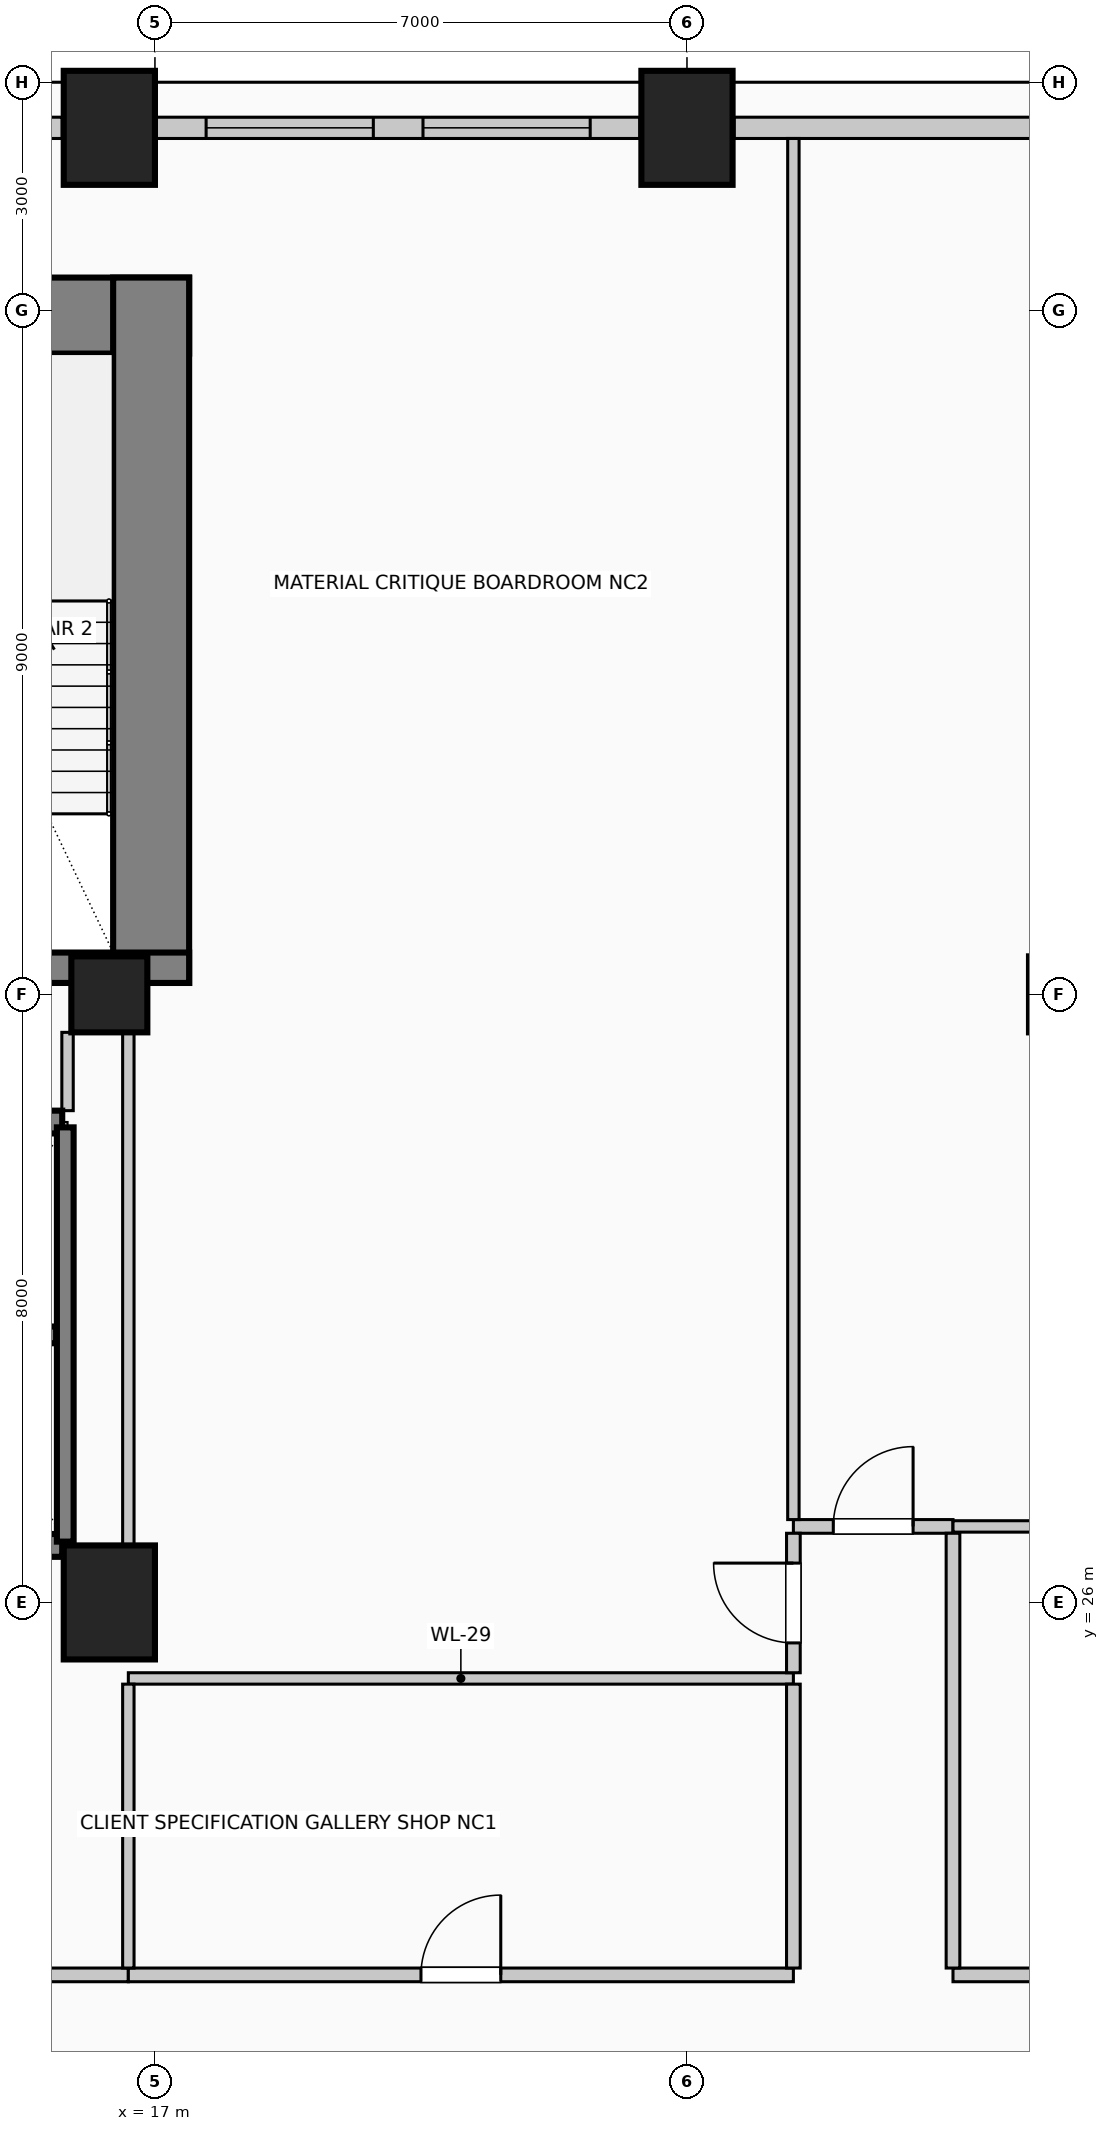
"""IFC4 building model, lengths in metres.
Left out: names, types, materials, properties, quantities, classifications, styles, units other than length and angle.
Written with IfcOpenShell. Run it as: python <this file> out.ifc"""

import sys

from ifc_helpers import new_model, si_unit, direction, frame, frame_2d, origin, origin_2d, place, context, subcontext, project, spatial, rectangle, circle, extrude, element, fill, save


model = new_model("IFC4")
c1 = context("Model", 3, precision=1e-05, world=origin(), true_north=direction((0.0, 1.0)))
c2 = subcontext(c1, "Body", "Model", "MODEL_VIEW")
j1 = project(units=[si_unit("LENGTHUNIT", "METRE"), si_unit("PLANEANGLEUNIT", "RADIAN")], contexts=[c1])
p1 = place(None, origin())
s1 = spatial("IfcSite", under=j1, at=p1, CompositionType="ELEMENT")
p2 = place(p1, origin())
s2 = spatial("IfcBuilding", under=s1, at=p2, CompositionType="ELEMENT")
p3 = place(p2, frame((0.0, 0.0, 58.6)))
s3 = spatial("IfcBuildingStorey", under=s2, at=p3, CompositionType="ELEMENT", Elevation=58.6)
p4 = place(p3, frame((2.55, 42.93, 0.0), z_axis=(0.0, 0.0, 1.0), x_axis=(1.0, 0.0, 0.0)))
e1 = element("IfcWall", 1, at=p4, inside=s3, PredefinedType="SHEAR", context=c2, shape_type="SweptSolid", body=[
    extrude(rectangle(XDim=14.9, YDim=1.0, at=frame_2d((7.45, 0.0))), origin(), (0.0, 0.0, 1.0), 4.0),
])
p5 = place(p3, frame((16.95, 34.15, 0.0), z_axis=(0.0, 0.0, 1.0), x_axis=(0.0, 1.0, 0.0)))
e2 = element("IfcWall", 2, at=p5, inside=s3, PredefinedType="SHEAR", context=c2, shape_type="SweptSolid", body=[
    extrude(rectangle(XDim=9.28, YDim=1.0, at=frame_2d((4.64, 0.0))), origin(), (0.0, 0.0, 1.0), 4.0),
])
p6 = place(p3, frame((12.29, 34.35, 0.0), z_axis=(0.0, 0.0, 1.0), x_axis=(1.0, 0.0, 0.0)))
e3 = element("IfcWall", 3, at=p6, inside=s3, PredefinedType="SHEAR", context=c2, shape_type="SweptSolid", body=[
    extrude(rectangle(XDim=5.16, YDim=0.4, at=frame_2d((2.58, 0.0))), origin(), (0.0, 0.0, 1.0), 4.0),
])
p7 = place(p6, frame((1.4, 0.0, 0.0)))
e4 = element("IfcOpeningElement", 4, at=p7, cuts=e3, PredefinedType="OPENING", context=c2, shape_type="SweptSolid", body=[
    extrude(rectangle(XDim=1.15, YDim=2.2, at=frame_2d((0.575, 1.1))), frame((0.0, 0.21, 0.0), z_axis=(0.0, -1.0, 0.0), x_axis=(1.0, 0.0, 0.0)), (0.0, 0.0, 1.0), 0.42),
])
for number, where, z_axis, x_axis in (
    (5, (16.4, 45.4, 0.0), (0.0, 0.0, 1.0), (1.0, 0.0, 0.0)),
    (6, (24.0, 45.4, 0.0), (0.0, 0.0, 1.0), (1.0, 0.0, 0.0)),
    (7, (16.4, 26.0, 0.0), (0.0, 0.0, 1.0), (1.0, 0.0, 0.0)),
):
    element("IfcColumn", number, at=place(p3, frame(where, z_axis=z_axis, x_axis=x_axis)), inside=s3, PredefinedType="COLUMN", context=c2, shape_type="SweptSolid", body=[
        extrude(rectangle(XDim=1.2, YDim=1.5, at=origin_2d()), origin(), (0.0, 0.0, 1.0), 4.0),
    ])
p8 = place(p3, frame((16.4, 34.0, 0.0), z_axis=(0.0, 0.0, 1.0), x_axis=(1.0, 0.0, 0.0)))
e8 = element("IfcColumn", 8, at=p8, inside=s3, PredefinedType="COLUMN", context=c2, shape_type="SweptSolid", body=[
    extrude(circle(Radius=0.5, at=origin_2d()), origin(), (0.0, 0.0, 1.0), 4.0),
])
p9 = place(p3, frame((14.47, 45.4, 0.0), z_axis=(0.0, 0.0, 1.0), x_axis=(1.0, 0.0, 0.0)))
e9 = element("IfcWall", 9, at=p9, inside=s3, PredefinedType="SOLIDWALL", context=c2, shape_type="SweptSolid", body=[
    extrude(rectangle(XDim=1.31, YDim=0.28, at=frame_2d((0.655, 0.0))), origin(), (0.0, 0.0, 1.0), 2.85),
])
p10 = place(p3, frame((17.02, 45.4, 0.0), z_axis=(0.0, 0.0, 1.0), x_axis=(1.0, 0.0, 0.0)))
e10 = element("IfcWall", 10, at=p10, inside=s3, PredefinedType="SOLIDWALL", context=c2, shape_type="SweptSolid", body=[
    extrude(rectangle(XDim=6.36, YDim=0.28, at=frame_2d((3.18, 0.0))), origin(), (0.0, 0.0, 1.0), 2.85),
])
p11 = place(p10, frame((0.653, 0.0, 0.5)))
e11 = element("IfcOpeningElement", 11, at=p11, cuts=e10, PredefinedType="OPENING", context=c2, shape_type="SweptSolid", body=[
    extrude(rectangle(XDim=2.2, YDim=1.95, at=frame_2d((1.1, 0.975))), frame((0.0, 0.15, 0.0), z_axis=(0.0, -1.0, 0.0), x_axis=(1.0, 0.0, 0.0)), (0.0, 0.0, 1.0), 0.3),
])
p12 = place(p10, frame((3.507, 0.0, 0.5)))
e12 = element("IfcOpeningElement", 12, at=p12, cuts=e10, PredefinedType="OPENING", context=c2, shape_type="SweptSolid", body=[
    extrude(rectangle(XDim=2.2, YDim=1.95, at=frame_2d((1.1, 0.975))), frame((0.0, 0.15, 0.0), z_axis=(0.0, -1.0, 0.0), x_axis=(1.0, 0.0, 0.0)), (0.0, 0.0, 1.0), 0.3),
])
p13 = place(p3, frame((24.62, 45.4, 0.0), z_axis=(0.0, 0.0, 1.0), x_axis=(1.0, 0.0, 0.0)))
e13 = element("IfcWall", 13, at=p13, inside=s3, PredefinedType="SOLIDWALL", context=c2, shape_type="SweptSolid", body=[
    extrude(rectangle(XDim=3.91, YDim=0.28, at=frame_2d((1.955, 0.0))), origin(), (0.0, 0.0, 1.0), 2.85),
])
for number, where, z_axis, x_axis in (
    (14, (15.78, 26.75, 0.0), (0.0, 0.0, 1.0), (-1.0, 0.0, 0.0)),
    (15, (14.0, 32.32, 0.0), (0.0, 0.0, 1.0), (1.0, 0.0, 0.0)),
):
    element("IfcWall", number, at=place(p3, frame(where, z_axis=z_axis, x_axis=x_axis)), inside=s3, PredefinedType="SOLIDWALL", context=c2, shape_type="SweptSolid", body=[
        extrude(rectangle(XDim=1.78, YDim=0.3, at=frame_2d((0.89, 0.0))), origin(), (0.0, 0.0, 1.0), 4.0),
    ])
p14 = place(p3, frame((15.82, 26.8, 0.0), z_axis=(0.0, 0.0, 1.0), x_axis=(0.0, 1.0, 0.0)))
e16 = element("IfcWall", 16, at=p14, inside=s3, PredefinedType="SOLIDWALL", context=c2, shape_type="SweptSolid", body=[
    extrude(rectangle(XDim=5.45, YDim=0.22, at=frame_2d((2.725, 0.0))), origin(), (0.0, 0.0, 1.0), 4.0),
])
p15 = place(p3, frame((12.3, 29.52, 0.0), z_axis=(0.0, 0.0, 1.0), x_axis=(1.0, 0.0, 0.0)))
e17 = element("IfcWall", 17, at=p15, inside=s3, PredefinedType="SOLIDWALL", context=c2, shape_type="SweptSolid", body=[
    extrude(rectangle(XDim=3.4, YDim=0.22, at=frame_2d((1.7, 0.0))), origin(), (0.0, 0.0, 1.0), 4.0),
])
p16 = place(p3, frame((12.2, 21.1, 0.0), z_axis=(0.0, 0.0, 1.0), x_axis=(1.0, 0.0, 0.0)))
e18 = element("IfcWall", 18, at=p16, inside=s3, PredefinedType="PARTITIONING", context=c2, shape_type="SweptSolid", body=[
    extrude(rectangle(XDim=4.45, YDim=0.18, at=frame_2d((2.225, 0.0))), origin(), (0.0, 0.0, 1.0), 3.7),
])
p17 = place(p3, frame((16.65, 21.1, 0.0), z_axis=(0.0, 0.0, 1.0), x_axis=(1.0, 0.0, 0.0)))
e19 = element("IfcWall", 19, at=p17, inside=s3, PredefinedType="PARTITIONING", context=c2, shape_type="SweptSolid", body=[
    extrude(rectangle(XDim=8.75, YDim=0.18, at=frame_2d((4.375, 0.0))), origin(), (0.0, 0.0, 1.0), 3.7),
])
p18 = place(p17, frame((3.85, 0.0, 0.0)))
e20 = element("IfcOpeningElement", 20, at=p18, cuts=e19, PredefinedType="OPENING", context=c2, shape_type="SweptSolid", body=[
    extrude(rectangle(XDim=1.05, YDim=2.15, at=frame_2d((0.525, 1.075))), frame((0.0, 0.1, 0.0), z_axis=(0.0, -1.0, 0.0), x_axis=(1.0, 0.0, 0.0)), (0.0, 0.0, 1.0), 0.2),
])
p19 = place(p3, frame((27.5, 21.1, 0.0), z_axis=(0.0, 0.0, 1.0), x_axis=(1.0, 0.0, 0.0)))
e21 = element("IfcWall", 21, at=p19, inside=s3, PredefinedType="PARTITIONING", context=c2, shape_type="SweptSolid", body=[
    extrude(rectangle(XDim=14.05, YDim=0.18, at=frame_2d((7.025, 0.0))), origin(), (0.0, 0.0, 1.0), 3.7),
])
p20 = place(p19, frame((6.55, 0.0, 0.0)))
e22 = element("IfcOpeningElement", 22, at=p20, cuts=e21, PredefinedType="OPENING", context=c2, shape_type="SweptSolid", body=[
    extrude(rectangle(XDim=0.95, YDim=2.15, at=frame_2d((0.475, 1.075))), frame((0.0, 0.1, 0.0), z_axis=(0.0, -1.0, 0.0), x_axis=(1.0, 0.0, 0.0)), (0.0, 0.0, 1.0), 0.2),
])
p21 = place(p3, frame((16.65, 25.0, 0.0), z_axis=(0.0, 0.0, 1.0), x_axis=(1.0, 0.0, 0.0)))
e23 = element("IfcWall", 23, at=p21, inside=s3, PredefinedType="PARTITIONING", context=c2, shape_type="SweptSolid", body=[
    extrude(rectangle(XDim=8.75, YDim=0.15, at=frame_2d((4.375, 0.0))), origin(), (0.0, 0.0, 1.0), 3.7),
])
p22 = place(p3, frame((25.4, 27.0, 0.0), z_axis=(0.0, 0.0, 1.0), x_axis=(1.0, 0.0, 0.0)))
e24 = element("IfcWall", 24, at=p22, inside=s3, PredefinedType="PARTITIONING", context=c2, shape_type="SweptSolid", body=[
    extrude(rectangle(XDim=2.1, YDim=0.18, at=frame_2d((1.05, 0.0))), origin(), (0.0, 0.0, 1.0), 3.7),
])
p23 = place(p22, frame((0.525, 0.0, 0.0)))
e25 = element("IfcOpeningElement", 25, at=p23, cuts=e24, PredefinedType="OPENING", context=c2, shape_type="SweptSolid", body=[
    extrude(rectangle(XDim=1.05, YDim=2.15, at=frame_2d((0.525, 1.075))), frame((0.0, 0.1, 0.0), z_axis=(0.0, -1.0, 0.0), x_axis=(1.0, 0.0, 0.0)), (0.0, 0.0, 1.0), 0.2),
])
p24 = place(p3, frame((27.5, 27.0, 0.0), z_axis=(0.0, 0.0, 1.0), x_axis=(1.0, 0.0, 0.0)))
e26 = element("IfcWall", 26, at=p24, inside=s3, PredefinedType="PARTITIONING", context=c2, shape_type="SweptSolid", body=[
    extrude(rectangle(XDim=14.05, YDim=0.15, at=frame_2d((7.025, 0.0))), origin(), (0.0, 0.0, 1.0), 3.7),
])
p25 = place(p3, frame((15.85, 32.47, 0.0), z_axis=(0.0, 0.0, 1.0), x_axis=(0.0, 1.0, 0.0)))
e27 = element("IfcWall", 27, at=p25, inside=s3, PredefinedType="PARTITIONING", context=c2, shape_type="SweptSolid", body=[
    extrude(rectangle(XDim=1.03, YDim=0.15, at=frame_2d((0.515, 0.0))), origin(), (0.0, 0.0, 1.0), 3.7),
])
p26 = place(p3, frame((16.65, 21.19, 0.0), z_axis=(0.0, 0.0, 1.0), x_axis=(0.0, 1.0, 0.0)))
e28 = element("IfcWall", 28, at=p26, inside=s3, PredefinedType="PARTITIONING", context=c2, shape_type="SweptSolid", body=[
    extrude(rectangle(XDim=3.735, YDim=0.15, at=frame_2d((1.868, 0.0))), origin(), (0.0, 0.0, 1.0), 2.995),
])
p27 = place(p3, frame((16.65, 26.75, 0.0), z_axis=(0.0, 0.0, 1.0), x_axis=(0.0, 1.0, 0.0)))
e29 = element("IfcWall", 29, at=p27, inside=s3, PredefinedType="PARTITIONING", context=c2, shape_type="SweptSolid", body=[
    extrude(rectangle(XDim=6.75, YDim=0.15, at=frame_2d((3.375, 0.0))), origin(), (0.0, 0.0, 1.0), 2.995),
])
p28 = place(p3, frame((25.4, 21.19, 0.0), z_axis=(0.0, 0.0, 1.0), x_axis=(0.0, 1.0, 0.0)))
e30 = element("IfcWall", 30, at=p28, inside=s3, PredefinedType="PARTITIONING", context=c2, shape_type="SweptSolid", body=[
    extrude(rectangle(XDim=3.735, YDim=0.18, at=frame_2d((1.868, 0.0))), origin(), (0.0, 0.0, 1.0), 3.7),
])
p29 = place(p3, frame((25.4, 25.075, 0.0), z_axis=(0.0, 0.0, 1.0), x_axis=(0.0, 1.0, 0.0)))
e31 = element("IfcWall", 31, at=p29, inside=s3, PredefinedType="PARTITIONING", context=c2, shape_type="SweptSolid", body=[
    extrude(rectangle(XDim=1.835, YDim=0.18, at=frame_2d((0.917, 0.0))), origin(), (0.0, 0.0, 1.0), 3.7),
])
p30 = place(p29, frame((0.393, 0.0, 0.0)))
e32 = element("IfcOpeningElement", 32, at=p30, cuts=e31, PredefinedType="OPENING", context=c2, shape_type="SweptSolid", body=[
    extrude(rectangle(XDim=1.05, YDim=2.15, at=frame_2d((0.525, 1.075))), frame((0.0, 0.1, 0.0), z_axis=(0.0, -1.0, 0.0), x_axis=(1.0, 0.0, 0.0)), (0.0, 0.0, 1.0), 0.2),
])
p31 = place(p3, frame((25.4, 27.09, 0.0), z_axis=(0.0, 0.0, 1.0), x_axis=(0.0, 1.0, 0.0)))
e33 = element("IfcWall", 33, at=p31, inside=s3, PredefinedType="PARTITIONING", context=c2, shape_type="SweptSolid", body=[
    extrude(rectangle(XDim=18.17, YDim=0.15, at=frame_2d((9.085, 0.0))), origin(), (0.0, 0.0, 1.0), 3.7),
])
p32 = place(p3, frame((27.5, 21.19, 0.0), z_axis=(0.0, 0.0, 1.0), x_axis=(0.0, 1.0, 0.0)))
e34 = element("IfcWall", 34, at=p32, inside=s3, PredefinedType="PARTITIONING", context=c2, shape_type="SweptSolid", body=[
    extrude(rectangle(XDim=5.72, YDim=0.18, at=frame_2d((2.86, 0.0))), origin(), (0.0, 0.0, 1.0), 3.7),
])
p33 = place(p11, origin())
e35 = element("IfcWindow", 35, at=p33, inside=s3, PartitioningType="SINGLE_PANEL", PredefinedType="WINDOW", context=c2, shape_type="SweptSolid", body=[
    extrude(rectangle(XDim=2.2, YDim=1.95, at=frame_2d((1.1, 0.975))), frame((0.0, 0.03, 0.0), z_axis=(0.0, -1.0, 0.0), x_axis=(1.0, 0.0, 0.0)), (0.0, 0.0, 1.0), 0.06),
])
fill(e11, e35)
p34 = place(p12, origin())
e36 = element("IfcWindow", 36, at=p34, inside=s3, PartitioningType="SINGLE_PANEL", PredefinedType="WINDOW", context=c2, shape_type="SweptSolid", body=[
    extrude(rectangle(XDim=2.2, YDim=1.95, at=frame_2d((1.1, 0.975))), frame((0.0, 0.03, 0.0), z_axis=(0.0, -1.0, 0.0), x_axis=(1.0, 0.0, 0.0)), (0.0, 0.0, 1.0), 0.06),
])
fill(e12, e36)
p35 = place(p18, origin())
e37 = element("IfcDoor", 37, at=p35, inside=s3, OperationType="SINGLE_SWING_RIGHT", PredefinedType="DOOR", context=c2, shape_type="SweptSolid", body=[
    extrude(rectangle(XDim=1.05, YDim=2.15, at=frame_2d((0.525, 1.075))), frame((0.0, 0.025, 0.0), z_axis=(0.0, -1.0, 0.0), x_axis=(1.0, 0.0, 0.0)), (0.0, 0.0, 1.0), 0.05),
])
fill(e20, e37)
p36 = place(p23, origin())
e38 = element("IfcDoor", 38, at=p36, inside=s3, OperationType="SINGLE_SWING_RIGHT", PredefinedType="DOOR", context=c2, shape_type="SweptSolid", body=[
    extrude(rectangle(XDim=1.05, YDim=2.15, at=frame_2d((0.525, 1.075))), frame((0.0, 0.025, 0.0), z_axis=(0.0, -1.0, 0.0), x_axis=(1.0, 0.0, 0.0)), (0.0, 0.0, 1.0), 0.05),
])
fill(e25, e38)
p37 = place(p30, origin())
e39 = element("IfcDoor", 39, at=p37, inside=s3, OperationType="SINGLE_SWING_RIGHT", PredefinedType="DOOR", context=c2, shape_type="SweptSolid", body=[
    extrude(rectangle(XDim=1.05, YDim=2.15, at=frame_2d((0.525, 1.075))), frame((0.0, 0.025, 0.0), z_axis=(0.0, -1.0, 0.0), x_axis=(1.0, 0.0, 0.0)), (0.0, 0.0, 1.0), 0.05),
])
fill(e32, e39)
save(model, sys.argv[1])
